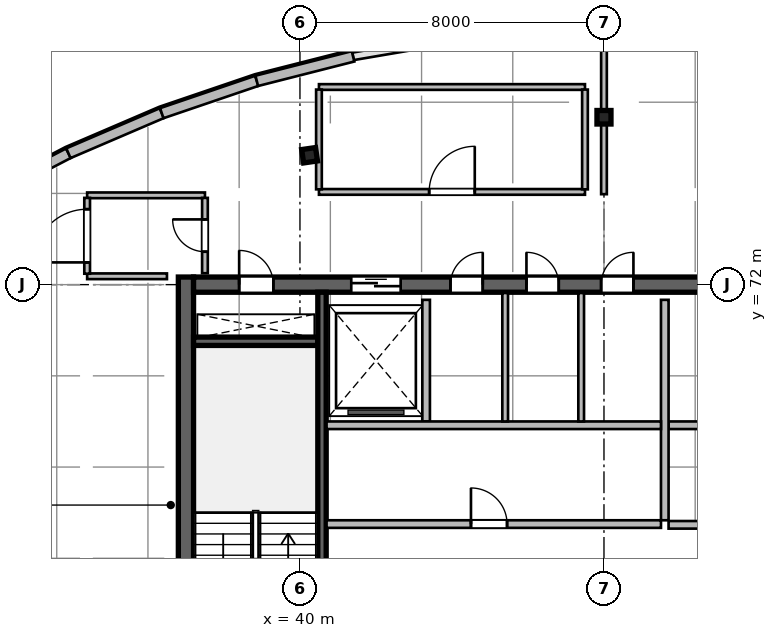
"""IFC4 building model, lengths in metres.
Left out: names, types, materials, properties, quantities, classifications, styles, units other than length and angle.
Written with IfcOpenShell. Run it as: python <this file> out.ifc"""

import sys

from ifc_helpers import new_model, si_unit, direction, frame, frame_2d, origin, origin_2d, place, context, subcontext, project, spatial, rectangle, i_section, extrude, source, transform, mapped, element, fill, save


model = new_model("IFC4")
c1 = context("Model", 3, precision=1e-05, world=origin(), true_north=direction((0.0, 1.0)))
c2 = subcontext(c1, "Body", "Model", "MODEL_VIEW")
j1 = project(units=[si_unit("LENGTHUNIT", "METRE"), si_unit("PLANEANGLEUNIT", "RADIAN")], contexts=[c1])
p1 = place(None, origin())
s1 = spatial("IfcSite", under=j1, at=p1, CompositionType="ELEMENT")
p2 = place(p1, origin())
s2 = spatial("IfcBuilding", under=s1, at=p2, CompositionType="ELEMENT")
p3 = place(p2, frame((0.0, 0.0, 303.0)))
s3 = spatial("IfcBuildingStorey", under=s2, at=p3, CompositionType="ELEMENT", Elevation=303.0)
m1 = source(origin(), c2, "Body", "SweptSolid", [
    extrude(rectangle(XDim=12.0, YDim=0.4, at=frame_2d((6.0, 0.0))), origin(), (0.0, 0.0, 1.0), 4.8),
])
p4 = place(p3, frame((37.0, 60.2, 0.0), z_axis=(0.0, 0.0, 1.0), x_axis=(0.0, 1.0, 0.0)))
e1 = element("IfcWall", 1, at=p4, inside=s3, PredefinedType="SHEAR", context=c2, shape_type="MappedRepresentation", body=[
    mapped(m1, transform((0.0, 0.0, 0.0), scale=1.0)),
])
m2 = source(origin(), c2, "Body", "SweptSolid", [
    extrude(rectangle(XDim=21.6, YDim=0.4, at=frame_2d((10.8, 0.0))), origin(), (0.0, 0.0, 1.0), 4.8),
])
p5 = place(p3, frame((37.2, 72.0, 0.0), z_axis=(0.0, 0.0, 1.0), x_axis=(1.0, 0.0, 0.0)))
e2 = element("IfcWall", 2, at=p5, inside=s3, PredefinedType="SHEAR", context=c2, shape_type="MappedRepresentation", body=[
    mapped(m2, transform((0.0, 0.0, 0.0), scale=1.0)),
])
p6 = place(p5, frame((1.2, 0.0, 0.0)))
e3 = element("IfcOpeningElement", 3, at=p6, cuts=e2, PredefinedType="OPENING", context=c2, shape_type="SweptSolid", body=[
    extrude(rectangle(XDim=0.9, YDim=2.1, at=frame_2d((0.45, 1.05))), frame((0.0, 0.21, 0.0), z_axis=(0.0, -1.0, 0.0), x_axis=(1.0, 0.0, 0.0)), (0.0, 0.0, 1.0), 0.42),
])
p7 = place(p5, frame((14.7, 0.0, 0.0)))
e4 = element("IfcOpeningElement", 4, at=p7, cuts=e2, PredefinedType="OPENING", context=c2, shape_type="SweptSolid", body=[
    extrude(rectangle(XDim=1.2, YDim=2.15, at=frame_2d((0.6, 1.075))), frame((0.0, 0.21, 0.0), z_axis=(0.0, -1.0, 0.0), x_axis=(1.0, 0.0, 0.0)), (0.0, 0.0, 1.0), 0.42),
])
p8 = place(p5, frame((4.15, 0.0, 0.0)))
e5 = element("IfcOpeningElement", 5, at=p8, cuts=e2, PredefinedType="OPENING", context=c2, shape_type="SweptSolid", body=[
    extrude(rectangle(XDim=1.3, YDim=2.15, at=frame_2d((0.65, 1.075))), frame((0.0, 0.21, 0.0), z_axis=(0.0, -1.0, 0.0), x_axis=(1.0, 0.0, 0.0)), (0.0, 0.0, 1.0), 0.42),
])
p9 = place(p5, frame((6.76, 0.0, 0.0)))
e6 = element("IfcOpeningElement", 6, at=p9, cuts=e2, PredefinedType="OPENING", context=c2, shape_type="SweptSolid", body=[
    extrude(rectangle(XDim=0.85, YDim=2.1, at=frame_2d((0.425, 1.05))), frame((0.0, 0.21, 0.0), z_axis=(0.0, -1.0, 0.0), x_axis=(1.0, 0.0, 0.0)), (0.0, 0.0, 1.0), 0.42),
])
p10 = place(p5, frame((8.76, 0.0, 0.0)))
e7 = element("IfcOpeningElement", 7, at=p10, cuts=e2, PredefinedType="OPENING", context=c2, shape_type="SweptSolid", body=[
    extrude(rectangle(XDim=0.85, YDim=2.1, at=frame_2d((0.425, 1.05))), frame((0.0, 0.21, 0.0), z_axis=(0.0, -1.0, 0.0), x_axis=(1.0, 0.0, 0.0)), (0.0, 0.0, 1.0), 0.42),
])
p11 = place(p5, frame((10.725, 0.0, 0.0)))
e8 = element("IfcOpeningElement", 8, at=p11, cuts=e2, PredefinedType="OPENING", context=c2, shape_type="SweptSolid", body=[
    extrude(rectangle(XDim=0.85, YDim=2.1, at=frame_2d((0.425, 1.05))), frame((0.0, 0.21, 0.0), z_axis=(0.0, -1.0, 0.0), x_axis=(1.0, 0.0, 0.0)), (0.0, 0.0, 1.0), 0.42),
])
m3 = source(origin(), c2, "Body", "SweptSolid", [
    extrude(rectangle(XDim=3.27, YDim=0.22, at=frame_2d((1.635, 0.0))), origin(), (0.0, 0.0, 1.0), 4.8),
])
p12 = place(p3, frame((37.2, 70.51, 0.0), z_axis=(0.0, 0.0, 1.0), x_axis=(1.0, 0.0, 0.0)))
e9 = element("IfcWall", 9, at=p12, inside=s3, PredefinedType="SHEAR", context=c2, shape_type="MappedRepresentation", body=[
    mapped(m3, transform((0.0, 0.0, 0.0), scale=1.0)),
])
m4 = source(origin(), c2, "Body", "SweptSolid", [
    extrude(rectangle(XDim=11.2, YDim=0.22, at=frame_2d((5.6, 0.0))), origin(), (0.0, 0.0, 1.0), 4.8),
])
p13 = place(p3, frame((40.58, 60.6, 0.0), z_axis=(0.0, 0.0, 1.0), x_axis=(0.0, 1.0, 0.0)))
e10 = element("IfcWall", 10, at=p13, inside=s3, PredefinedType="SHEAR", context=c2, shape_type="MappedRepresentation", body=[
    mapped(m4, transform((0.0, 0.0, 0.0), scale=1.0)),
])
m5 = source(origin(), c2, "Body", "SweptSolid", [
    extrude(i_section(OverallWidth=0.369, OverallDepth=0.356, WebThickness=0.011, FlangeThickness=0.018, at=origin_2d()), origin(), (0.0, 0.0, 1.0), 4.8),
])
for number, where, z_axis, x_axis in (
    (11, (40.253, 75.404, 0.0), (0.0, 0.0, 1.0), (-0.143, 0.99, 0.0)),
    (12, (48.0, 76.404, 0.0), (0.0, 0.0, 1.0), (0.0, 1.0, 0.0)),
):
    element("IfcColumn", number, at=place(p3, frame(where, z_axis=z_axis, x_axis=x_axis)), inside=s3, PredefinedType="COLUMN", context=c2, shape_type="MappedRepresentation", body=[
        mapped(m5, transform((0.0, 0.0, 0.0), scale=1.0)),
    ])
m6 = source(origin(), c2, "Body", "SweptSolid", [
    extrude(rectangle(XDim=2.711, YDim=0.28, at=frame_2d((1.356, 0.0))), origin(), (0.0, 0.0, 1.0), 4.54),
])
p14 = place(p3, frame((31.502, 74.205, 0.0), z_axis=(0.0, 0.0, 1.0), x_axis=(0.886828760751, 0.462098202881, 0.0)))
e13 = element("IfcWall", 13, at=p14, inside=s3, PredefinedType="SOLIDWALL", context=c2, shape_type="MappedRepresentation", body=[
    mapped(m6, transform((0.0, 0.0, 0.0), scale=1.0)),
])
m7 = source(origin(), c2, "Body", "SweptSolid", [
    extrude(rectangle(XDim=2.673, YDim=0.28, at=frame_2d((1.337, 0.0))), origin(), (0.0, 0.0, 1.0), 4.54),
])
p15 = place(p3, frame((33.907, 75.458, 0.0), z_axis=(0.0, 0.0, 1.0), x_axis=(0.919036345912, 0.394172798266, 0.0)))
e14 = element("IfcWall", 14, at=p15, inside=s3, PredefinedType="SOLIDWALL", context=c2, shape_type="MappedRepresentation", body=[
    mapped(m7, transform((0.0, 0.0, 0.0), scale=1.0)),
])
m8 = source(origin(), c2, "Body", "SweptSolid", [
    extrude(rectangle(XDim=2.64, YDim=0.28, at=frame_2d((1.32, 0.0))), origin(), (0.0, 0.0, 1.0), 4.54),
])
p16 = place(p3, frame((36.364, 76.511, 0.0), z_axis=(0.0, 0.0, 1.0), x_axis=(0.946685911962, 0.322158011064, 0.0)))
e15 = element("IfcWall", 15, at=p16, inside=s3, PredefinedType="SOLIDWALL", context=c2, shape_type="MappedRepresentation", body=[
    mapped(m8, transform((0.0, 0.0, 0.0), scale=1.0)),
])
m9 = source(origin(), c2, "Body", "SweptSolid", [
    extrude(rectangle(XDim=2.614, YDim=0.28, at=frame_2d((1.307, 0.0))), origin(), (0.0, 0.0, 1.0), 4.54),
])
p17 = place(p3, frame((38.863, 77.362, 0.0), z_axis=(0.0, 0.0, 1.0), x_axis=(0.969106509315, 0.246642602978, 0.0)))
e16 = element("IfcWall", 16, at=p17, inside=s3, PredefinedType="SOLIDWALL", context=c2, shape_type="MappedRepresentation", body=[
    mapped(m9, transform((0.0, 0.0, 0.0), scale=1.0)),
])
m10 = source(origin(), c2, "Body", "SweptSolid", [
    extrude(rectangle(XDim=5.62, YDim=0.2, at=frame_2d((2.81, 0.0))), origin(), (0.0, 0.0, 1.0), 4.54),
])
p18 = place(p3, frame((49.7, 68.3, 0.0), z_axis=(0.0, 0.0, 1.0), x_axis=(1.0, 0.0, 0.0)))
e17 = element("IfcWall", 17, at=p18, inside=s3, PredefinedType="SOLIDWALL", context=c2, shape_type="MappedRepresentation", body=[
    mapped(m10, transform((0.0, 0.0, 0.0), scale=1.0)),
])
p19 = place(p18, frame((1.6, 0.0, 0.0)))
e18 = element("IfcOpeningElement", 18, at=p19, cuts=e17, PredefinedType="OPENING", context=c2, shape_type="SweptSolid", body=[
    extrude(rectangle(XDim=1.1, YDim=2.15, at=frame_2d((0.55, 1.075))), frame((0.0, 0.11, 0.0), z_axis=(0.0, -1.0, 0.0), x_axis=(1.0, 0.0, 0.0)), (0.0, 0.0, 1.0), 0.22),
])
p20 = place(p18, frame((3.7, 0.0, 0.0)))
e19 = element("IfcOpeningElement", 19, at=p20, cuts=e17, PredefinedType="OPENING", context=c2, shape_type="SweptSolid", body=[
    extrude(rectangle(XDim=1.1, YDim=2.15, at=frame_2d((0.55, 1.075))), frame((0.0, 0.11, 0.0), z_axis=(0.0, -1.0, 0.0), x_axis=(1.0, 0.0, 0.0)), (0.0, 0.0, 1.0), 0.22),
])
m11 = source(origin(), c2, "Body", "SweptSolid", [
    extrude(rectangle(XDim=5.8, YDim=0.2, at=frame_2d((2.9, 0.0))), origin(), (0.0, 0.0, 1.0), 4.54),
])
p21 = place(p3, frame((49.6, 65.8, 0.0), z_axis=(0.0, 0.0, 1.0), x_axis=(0.0, 1.0, 0.0)))
e20 = element("IfcWall", 20, at=p21, inside=s3, PredefinedType="SOLIDWALL", context=c2, shape_type="MappedRepresentation", body=[
    mapped(m11, transform((0.0, 0.0, 0.0), scale=1.0)),
])
p22 = place(p3, frame((49.7, 65.68, 0.0), z_axis=(0.0, 0.0, 1.0), x_axis=(1.0, 0.0, 0.0)))
e21 = element("IfcWall", 21, at=p22, inside=s3, PredefinedType="SOLIDWALL", context=c2, shape_type="MappedRepresentation", body=[
    mapped(m10, transform((0.0, 0.0, 0.0), scale=1.0)),
])
m12 = source(origin(), c2, "Body", "SweptSolid", [
    extrude(rectangle(XDim=3.2, YDim=0.2, at=frame_2d((1.6, 0.0))), origin(), (0.0, 0.0, 1.0), 4.54),
])
p23 = place(p3, frame((43.32, 68.4, 0.0), z_axis=(0.0, 0.0, 1.0), x_axis=(0.0, 1.0, 0.0)))
e22 = element("IfcWall", 22, at=p23, inside=s3, PredefinedType="SOLIDWALL", context=c2, shape_type="MappedRepresentation", body=[
    mapped(m12, transform((0.0, 0.0, 0.0), scale=1.0)),
])
m13 = source(origin(), c2, "Body", "SweptSolid", [
    extrude(rectangle(XDim=8.8, YDim=0.2, at=frame_2d((4.4, 0.0))), origin(), (0.0, 0.0, 1.0), 4.54),
])
p24 = place(p3, frame((40.7, 68.3, 0.0), z_axis=(0.0, 0.0, 1.0), x_axis=(1.0, 0.0, 0.0)))
e23 = element("IfcWall", 23, at=p24, inside=s3, PredefinedType="SOLIDWALL", context=c2, shape_type="MappedRepresentation", body=[
    mapped(m13, transform((0.0, 0.0, 0.0), scale=1.0)),
])
m14 = source(origin(), c2, "Body", "SweptSolid", [
    extrude(rectangle(XDim=3.38, YDim=0.15, at=frame_2d((1.69, 0.0))), origin(), (0.0, 0.0, 1.0), 4.54),
])
for number, where, z_axis, x_axis in (
    (24, (45.4, 68.4, 0.0), (0.0, 0.0, 1.0), (0.0, 1.0, 0.0)),
    (25, (47.4, 68.4, 0.0), (0.0, 0.0, 1.0), (0.0, 1.0, 0.0)),
):
    element("IfcWall", number, at=place(p3, frame(where, z_axis=z_axis, x_axis=x_axis)), inside=s3, PredefinedType="PARTITIONING", context=c2, shape_type="MappedRepresentation", body=[
        mapped(m14, transform((0.0, 0.0, 0.0), scale=1.0)),
    ])
p25 = place(p3, frame((40.7, 65.7, 0.0), z_axis=(0.0, 0.0, 1.0), x_axis=(1.0, 0.0, 0.0)))
e26 = element("IfcWall", 26, at=p25, inside=s3, PredefinedType="SOLIDWALL", context=c2, shape_type="MappedRepresentation", body=[
    mapped(m13, transform((0.0, 0.0, 0.0), scale=1.0)),
])
p26 = place(p25, frame((3.8, 0.0, 0.0)))
e27 = element("IfcOpeningElement", 27, at=p26, cuts=e26, PredefinedType="OPENING", context=c2, shape_type="SweptSolid", body=[
    extrude(rectangle(XDim=0.95, YDim=2.15, at=frame_2d((0.475, 1.075))), frame((0.0, 0.11, 0.0), z_axis=(0.0, -1.0, 0.0), x_axis=(1.0, 0.0, 0.0)), (0.0, 0.0, 1.0), 0.22),
])
m15 = source(origin(), c2, "Body", "SweptSolid", [
    extrude(rectangle(XDim=2.1, YDim=0.15, at=frame_2d((1.05, 0.0))), origin(), (0.0, 0.0, 1.0), 4.54),
])
p27 = place(p3, frame((34.4, 72.22, 0.0), z_axis=(0.0, 0.0, 1.0), x_axis=(1.0, 0.0, 0.0)))
e28 = element("IfcWall", 28, at=p27, inside=s3, PredefinedType="PARTITIONING", context=c2, shape_type="MappedRepresentation", body=[
    mapped(m15, transform((0.0, 0.0, 0.0), scale=1.0)),
])
m16 = source(origin(), c2, "Body", "SweptSolid", [
    extrude(rectangle(XDim=3.1, YDim=0.15, at=frame_2d((1.55, 0.0))), origin(), (0.0, 0.0, 1.0), 3.971),
])
p28 = place(p3, frame((34.4, 74.35, 0.0), z_axis=(0.0, 0.0, 1.0), x_axis=(1.0, 0.0, 0.0)))
e29 = element("IfcWall", 29, at=p28, inside=s3, PredefinedType="PARTITIONING", context=c2, shape_type="MappedRepresentation", body=[
    mapped(m16, transform((0.0, 0.0, 0.0), scale=1.0)),
])
m17 = source(origin(), c2, "Body", "SweptSolid", [
    extrude(rectangle(XDim=1.995, YDim=0.15, at=frame_2d((0.998, 0.0))), origin(), (0.0, 0.0, 1.0), 4.54),
])
p29 = place(p3, frame((34.4, 72.288, 0.0), z_axis=(0.0, 0.0, 1.0), x_axis=(0.0, 1.0, 0.0)))
e30 = element("IfcWall", 30, at=p29, inside=s3, PredefinedType="PARTITIONING", context=c2, shape_type="MappedRepresentation", body=[
    mapped(m17, transform((0.0, 0.0, 0.0), scale=1.0)),
])
p30 = place(p29, frame((0.298, 0.0, 0.0)))
e31 = element("IfcOpeningElement", 31, at=p30, cuts=e30, PredefinedType="OPENING", context=c2, shape_type="SweptSolid", body=[
    extrude(rectangle(XDim=1.4, YDim=2.15, at=frame_2d((0.7, 1.075))), frame((0.0, 0.085, 0.0), z_axis=(0.0, -1.0, 0.0), x_axis=(1.0, 0.0, 0.0)), (0.0, 0.0, 1.0), 0.17),
])
m18 = source(origin(), c2, "Body", "SweptSolid", [
    extrude(rectangle(XDim=1.982, YDim=0.15, at=frame_2d((0.991, 0.0))), origin(), (0.0, 0.0, 1.0), 4.54),
])
p31 = place(p3, frame((37.5, 72.3, 0.0), z_axis=(0.0, 0.0, 1.0), x_axis=(0.0, 1.0, 0.0)))
e32 = element("IfcWall", 32, at=p31, inside=s3, PredefinedType="PARTITIONING", context=c2, shape_type="MappedRepresentation", body=[
    mapped(m18, transform((0.0, 0.0, 0.0), scale=1.0)),
])
p32 = place(p31, frame((0.566, 0.0, 0.0)))
e33 = element("IfcOpeningElement", 33, at=p32, cuts=e32, PredefinedType="OPENING", context=c2, shape_type="SweptSolid", body=[
    extrude(rectangle(XDim=0.85, YDim=2.1, at=frame_2d((0.425, 1.05))), frame((0.0, 0.085, 0.0), z_axis=(0.0, -1.0, 0.0), x_axis=(1.0, 0.0, 0.0)), (0.0, 0.0, 1.0), 0.17),
])
m19 = source(origin(), c2, "Body", "SweptSolid", [
    extrude(rectangle(XDim=7.0, YDim=0.15, at=frame_2d((3.5, 0.0))), origin(), (0.0, 0.0, 1.0), 4.54),
])
p33 = place(p3, frame((40.5, 74.44, 0.0), z_axis=(0.0, 0.0, 1.0), x_axis=(1.0, 0.0, 0.0)))
e34 = element("IfcWall", 34, at=p33, inside=s3, PredefinedType="PARTITIONING", context=c2, shape_type="MappedRepresentation", body=[
    mapped(m19, transform((0.0, 0.0, 0.0), scale=1.0)),
])
p34 = place(p33, frame((2.9, 0.0, 0.0)))
e35 = element("IfcOpeningElement", 35, at=p34, cuts=e34, PredefinedType="OPENING", context=c2, shape_type="SweptSolid", body=[
    extrude(rectangle(XDim=1.2, YDim=2.15, at=frame_2d((0.6, 1.075))), frame((0.0, 0.085, 0.0), z_axis=(0.0, -1.0, 0.0), x_axis=(1.0, 0.0, 0.0)), (0.0, 0.0, 1.0), 0.17),
])
p35 = place(p3, frame((40.5, 77.2, 0.0), z_axis=(0.0, 0.0, 1.0), x_axis=(1.0, 0.0, 0.0)))
e36 = element("IfcWall", 36, at=p35, inside=s3, PredefinedType="PARTITIONING", context=c2, shape_type="MappedRepresentation", body=[
    mapped(m19, transform((0.0, 0.0, 0.0), scale=1.0)),
])
m20 = source(origin(), c2, "Body", "SweptSolid", [
    extrude(rectangle(XDim=2.625, YDim=0.15, at=frame_2d((1.312, 0.0))), origin(), (0.0, 0.0, 1.0), 4.54),
])
for number, where, z_axis, x_axis in (
    (37, (40.5, 74.508, 0.0), (0.0, 0.0, 1.0), (0.0, 1.0, 0.0)),
    (38, (47.5, 74.508, 0.0), (0.0, 0.0, 1.0), (0.0, 1.0, 0.0)),
):
    element("IfcWall", number, at=place(p3, frame(where, z_axis=z_axis, x_axis=x_axis)), inside=s3, PredefinedType="PARTITIONING", context=c2, shape_type="MappedRepresentation", body=[
        mapped(m20, transform((0.0, 0.0, 0.0), scale=1.0)),
    ])
m21 = source(origin(), c2, "Body", "SweptSolid", [
    extrude(rectangle(XDim=4.287, YDim=0.15, at=frame_2d((2.144, 0.0))), origin(), (0.0, 0.0, 1.0), 4.214),
])
p36 = place(p3, frame((48.0, 74.38, 0.0), z_axis=(0.0, 0.0, 1.0), x_axis=(0.0, 1.0, 0.0)))
e39 = element("IfcWall", 39, at=p36, inside=s3, PredefinedType="PARTITIONING", context=c2, shape_type="MappedRepresentation", body=[
    mapped(m21, transform((0.0, 0.0, 0.0), scale=1.0)),
])
m22 = source(origin(), c2, "Body", "SweptSolid", [
    extrude(rectangle(XDim=0.9, YDim=2.1, at=frame_2d((0.45, 1.05))), frame((0.0, 0.025, 0.0), z_axis=(0.0, -1.0, 0.0), x_axis=(1.0, 0.0, 0.0)), (0.0, 0.0, 1.0), 0.05),
])
p37 = place(p6, origin())
e40 = element("IfcDoor", 40, at=p37, inside=s3, OperationType="SINGLE_SWING_LEFT", PredefinedType="DOOR", context=c2, shape_type="MappedRepresentation", body=[
    mapped(m22, transform((0.0, 0.0, 0.0), scale=1.0)),
])
fill(e3, e40)
m23 = source(origin(), c2, "Body", "SweptSolid", [
    extrude(rectangle(XDim=1.3, YDim=2.15, at=frame_2d((0.65, 1.075))), frame((0.0, 0.025, 0.0), z_axis=(0.0, -1.0, 0.0), x_axis=(1.0, 0.0, 0.0)), (0.0, 0.0, 1.0), 0.05),
])
p38 = place(p8, origin())
e41 = element("IfcDoor", 41, at=p38, inside=s3, OperationType="DOUBLE_DOOR_SLIDING", PredefinedType="DOOR", context=c2, shape_type="MappedRepresentation", body=[
    mapped(m23, transform((0.0, 0.0, 0.0), scale=1.0)),
])
fill(e5, e41)
m24 = source(origin(), c2, "Body", "SweptSolid", [
    extrude(rectangle(XDim=0.85, YDim=2.1, at=frame_2d((0.425, 1.05))), frame((0.0, 0.025, 0.0), z_axis=(0.0, -1.0, 0.0), x_axis=(1.0, 0.0, 0.0)), (0.0, 0.0, 1.0), 0.05),
])
p39 = place(p9, origin())
e42 = element("IfcDoor", 42, at=p39, inside=s3, OperationType="SINGLE_SWING_RIGHT", PredefinedType="DOOR", context=c2, shape_type="MappedRepresentation", body=[
    mapped(m24, transform((0.0, 0.0, 0.0), scale=1.0)),
])
fill(e6, e42)
p40 = place(p10, origin())
e43 = element("IfcDoor", 43, at=p40, inside=s3, OperationType="SINGLE_SWING_LEFT", PredefinedType="DOOR", context=c2, shape_type="MappedRepresentation", body=[
    mapped(m24, transform((0.0, 0.0, 0.0), scale=1.0)),
])
fill(e7, e43)
p41 = place(p11, origin())
e44 = element("IfcDoor", 44, at=p41, inside=s3, OperationType="SINGLE_SWING_RIGHT", PredefinedType="DOOR", context=c2, shape_type="MappedRepresentation", body=[
    mapped(m24, transform((0.0, 0.0, 0.0), scale=1.0)),
])
fill(e8, e44)
m25 = source(origin(), c2, "Body", "SweptSolid", [
    extrude(rectangle(XDim=0.95, YDim=2.15, at=frame_2d((0.475, 1.075))), frame((0.0, 0.025, 0.0), z_axis=(0.0, -1.0, 0.0), x_axis=(1.0, 0.0, 0.0)), (0.0, 0.0, 1.0), 0.05),
])
p42 = place(p26, origin())
e45 = element("IfcDoor", 45, at=p42, inside=s3, OperationType="SINGLE_SWING_LEFT", PredefinedType="DOOR", context=c2, shape_type="MappedRepresentation", body=[
    mapped(m25, transform((0.0, 0.0, 0.0), scale=1.0)),
])
fill(e27, e45)
p43 = place(p32, origin())
e46 = element("IfcDoor", 46, at=p43, inside=s3, OperationType="SINGLE_SWING_RIGHT", PredefinedType="DOOR", context=c2, shape_type="MappedRepresentation", body=[
    mapped(m24, transform((0.0, 0.0, 0.0), scale=1.0)),
])
fill(e33, e46)
m26 = source(origin(), c2, "Body", "SweptSolid", [
    extrude(rectangle(XDim=1.2, YDim=2.15, at=frame_2d((0.6, 1.075))), frame((0.0, 0.025, 0.0), z_axis=(0.0, -1.0, 0.0), x_axis=(1.0, 0.0, 0.0)), (0.0, 0.0, 1.0), 0.05),
])
p44 = place(p34, origin())
e47 = element("IfcDoor", 47, at=p44, inside=s3, OperationType="SINGLE_SWING_RIGHT", PredefinedType="DOOR", context=c2, shape_type="MappedRepresentation", body=[
    mapped(m26, transform((0.0, 0.0, 0.0), scale=1.0)),
])
fill(e35, e47)
m27 = source(origin(), c2, "Body", "SweptSolid", [
    extrude(rectangle(XDim=1.4, YDim=2.15, at=frame_2d((0.7, 1.075))), frame((0.0, 0.025, 0.0), z_axis=(0.0, -1.0, 0.0), x_axis=(1.0, 0.0, 0.0)), (0.0, 0.0, 1.0), 0.05),
])
p45 = place(p30, origin())
e48 = element("IfcDoor", 48, at=p45, inside=s3, OperationType="SINGLE_SWING_LEFT", PredefinedType="DOOR", context=c2, shape_type="MappedRepresentation", body=[
    mapped(m27, transform((0.0, 0.0, 0.0), scale=1.0)),
])
fill(e31, e48)
save(model, sys.argv[1])
